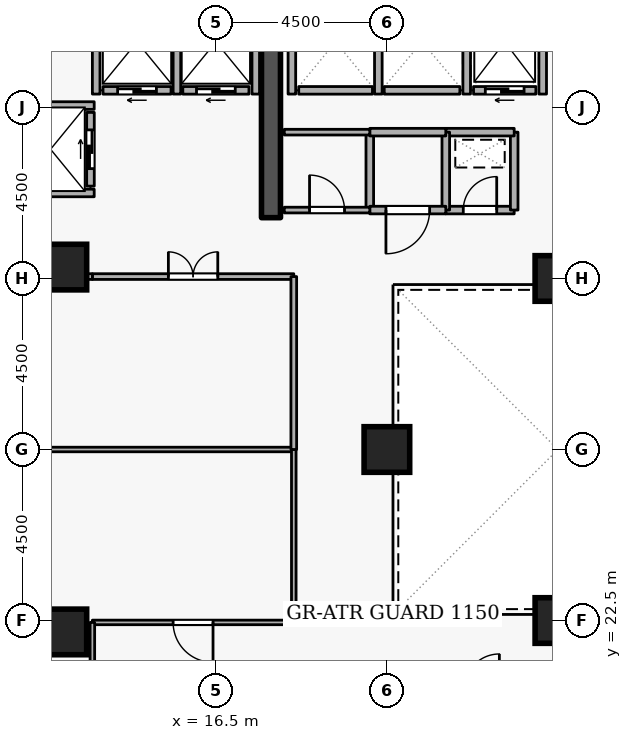
"""IFC4 building model, lengths in metres.
Left out: names, types, materials, properties, quantities, classifications, styles, units other than length and angle.
Written with IfcOpenShell. Run it as: python <this file> out.ifc"""

import sys

from ifc_helpers import new_model, si_unit, direction, frame, frame_2d, origin, origin_2d, place, context, subcontext, project, spatial, rectangle, extrude, element, fill, save


model = new_model("IFC4")
c1 = context("Model", 3, precision=1e-05, world=origin(), true_north=direction((0.0, 1.0)))
c2 = subcontext(c1, "Body", "Model", "MODEL_VIEW")
j1 = project(units=[si_unit("LENGTHUNIT", "METRE"), si_unit("PLANEANGLEUNIT", "RADIAN")], contexts=[c1])
p1 = place(None, origin())
s1 = spatial("IfcSite", under=j1, at=p1, CompositionType="ELEMENT")
p2 = place(p1, origin())
s2 = spatial("IfcBuilding", under=s1, at=p2, CompositionType="ELEMENT")
p3 = place(p2, frame((0.0, 0.0, 126.9)))
s3 = spatial("IfcBuildingStorey", under=s2, at=p3, CompositionType="ELEMENT", Elevation=126.9)
p4 = place(p3, frame((17.95, 33.1, 0.0), z_axis=(0.0, 0.0, 1.0), x_axis=(0.0, 1.0, 0.0)))
e1 = element("IfcWall", 1, at=p4, inside=s3, PredefinedType="SHEAR", context=c2, shape_type="SweptSolid", body=[
    extrude(rectangle(XDim=5.8, YDim=0.5, at=frame_2d((2.9, 0.0))), origin(), (0.0, 0.0, 1.0), 3.6),
])
for number, where, z_axis, x_axis in (
    (2, (12.5, 22.2, 0.0), (0.0, 0.0, 1.0), (1.0, 0.0, 0.0)),
    (3, (12.5, 31.8, 0.0), (0.0, 0.0, 1.0), (1.0, 0.0, 0.0)),
    (4, (25.5, 22.5, 0.0), (0.0, 0.0, 1.0), (1.0, 0.0, 0.0)),
    (5, (25.5, 31.5, 0.0), (0.0, 0.0, 1.0), (1.0, 0.0, 0.0)),
    (6, (21.0, 27.0, 0.0), (0.0, 0.0, 1.0), (1.0, 0.0, 0.0)),
):
    element("IfcColumn", number, at=place(p3, frame(where, z_axis=z_axis, x_axis=x_axis)), inside=s3, PredefinedType="COLUMN", context=c2, shape_type="SweptSolid", body=[
        extrude(rectangle(XDim=1.2, YDim=1.2, at=origin_2d()), origin(), (0.0, 0.0, 1.0), 3.6),
    ])
p5 = place(p3, frame((24.92, 36.45, 0.0), z_axis=(0.0, 0.0, 1.0), x_axis=(-1.0, 0.0, 0.0)))
e7 = element("IfcWall", 7, at=p5, inside=s3, PredefinedType="STANDARD", context=c2, shape_type="SweptSolid", body=[
    extrude(rectangle(XDim=1.64, YDim=0.2, at=frame_2d((0.82, 0.0))), origin(), (0.0, 0.0, 1.0), 3.34),
])
p6 = place(p5, frame((0.31, 0.0, 0.0)))
e8 = element("IfcOpeningElement", 8, at=p6, cuts=e7, PredefinedType="OPENING", context=c2, shape_type="SweptSolid", body=[
    extrude(rectangle(XDim=1.02, YDim=2.06, at=frame_2d((0.51, 1.03))), frame((0.0, 0.11, 0.0), z_axis=(0.0, -1.0, 0.0), x_axis=(1.0, 0.0, 0.0)), (0.0, 0.0, 1.0), 0.22),
])
p7 = place(p3, frame((22.92, 36.45, 0.0), z_axis=(0.0, 0.0, 1.0), x_axis=(-1.0, 0.0, 0.0)))
e9 = element("IfcWall", 9, at=p7, inside=s3, PredefinedType="STANDARD", context=c2, shape_type="SweptSolid", body=[
    extrude(rectangle(XDim=1.99, YDim=0.2, at=frame_2d((0.995, 0.0))), origin(), (0.0, 0.0, 1.0), 3.34),
])
p8 = place(p3, frame((20.62, 36.45, 0.0), z_axis=(0.0, 0.0, 1.0), x_axis=(-1.0, 0.0, 0.0)))
e10 = element("IfcWall", 10, at=p8, inside=s3, PredefinedType="STANDARD", context=c2, shape_type="SweptSolid", body=[
    extrude(rectangle(XDim=1.94, YDim=0.2, at=frame_2d((0.97, 0.0))), origin(), (0.0, 0.0, 1.0), 3.34),
])
p9 = place(p3, frame((17.37, 36.45, 0.0), z_axis=(0.0, 0.0, 1.0), x_axis=(-1.0, 0.0, 0.0)))
e11 = element("IfcWall", 11, at=p9, inside=s3, PredefinedType="STANDARD", context=c2, shape_type="SweptSolid", body=[
    extrude(rectangle(XDim=1.74, YDim=0.2, at=frame_2d((0.87, 0.0))), origin(), (0.0, 0.0, 1.0), 3.34),
])
p10 = place(p9, frame((0.36, 0.0, 0.0)))
e12 = element("IfcOpeningElement", 12, at=p10, cuts=e11, PredefinedType="OPENING", context=c2, shape_type="SweptSolid", body=[
    extrude(rectangle(XDim=1.02, YDim=2.06, at=frame_2d((0.51, 1.03))), frame((0.0, 0.11, 0.0), z_axis=(0.0, -1.0, 0.0), x_axis=(1.0, 0.0, 0.0)), (0.0, 0.0, 1.0), 0.22),
])
p11 = place(p3, frame((15.32, 36.45, 0.0), z_axis=(0.0, 0.0, 1.0), x_axis=(-1.0, 0.0, 0.0)))
e13 = element("IfcWall", 13, at=p11, inside=s3, PredefinedType="STANDARD", context=c2, shape_type="SweptSolid", body=[
    extrude(rectangle(XDim=1.79, YDim=0.2, at=frame_2d((0.895, 0.0))), origin(), (0.0, 0.0, 1.0), 3.34),
])
p12 = place(p11, frame((0.385, 0.0, 0.0)))
e14 = element("IfcOpeningElement", 14, at=p12, cuts=e13, PredefinedType="OPENING", context=c2, shape_type="SweptSolid", body=[
    extrude(rectangle(XDim=1.02, YDim=2.06, at=frame_2d((0.51, 1.03))), frame((0.0, 0.11, 0.0), z_axis=(0.0, -1.0, 0.0), x_axis=(1.0, 0.0, 0.0)), (0.0, 0.0, 1.0), 0.22),
])
p13 = place(p3, frame((13.2, 33.93, 0.0), z_axis=(0.0, 0.0, 1.0), x_axis=(0.0, 1.0, 0.0)))
e15 = element("IfcWall", 15, at=p13, inside=s3, PredefinedType="STANDARD", context=c2, shape_type="SweptSolid", body=[
    extrude(rectangle(XDim=1.94, YDim=0.2, at=frame_2d((0.97, 0.0))), origin(), (0.0, 0.0, 1.0), 3.34),
])
p14 = place(p13, frame((0.46, 0.0, 0.0)))
e16 = element("IfcOpeningElement", 16, at=p14, cuts=e15, PredefinedType="OPENING", context=c2, shape_type="SweptSolid", body=[
    extrude(rectangle(XDim=1.02, YDim=2.06, at=frame_2d((0.51, 1.03))), frame((0.0, 0.11, 0.0), z_axis=(0.0, -1.0, 0.0), x_axis=(1.0, 0.0, 0.0)), (0.0, 0.0, 1.0), 0.22),
])
for number, where, z_axis, x_axis in (
    (17, (25.1, 36.352, 0.0), (0.0, 0.0, 1.0), (0.0, 1.0, 0.0)),
    (18, (23.1, 36.352, 0.0), (0.0, 0.0, 1.0), (0.0, 1.0, 0.0)),
    (19, (20.775, 36.352, 0.0), (0.0, 0.0, 1.0), (0.0, 1.0, 0.0)),
    (20, (18.5, 36.352, 0.0), (0.0, 0.0, 1.0), (0.0, 1.0, 0.0)),
):
    element("IfcWall", number, at=place(p3, frame(where, z_axis=z_axis, x_axis=x_axis)), inside=s3, PredefinedType="STANDARD", context=c2, shape_type="SweptSolid", body=[
        extrude(rectangle(XDim=2.536, YDim=0.2, at=frame_2d((1.268, 0.0))), origin(), (0.0, 0.0, 1.0), 3.34),
    ])
p15 = place(p3, frame((17.55, 36.352, 0.0), z_axis=(0.0, 0.0, 1.0), x_axis=(0.0, 1.0, 0.0)))
e21 = element("IfcWall", 21, at=p15, inside=s3, PredefinedType="STANDARD", context=c2, shape_type="SweptSolid", body=[
    extrude(rectangle(XDim=2.636, YDim=0.2, at=frame_2d((1.318, 0.0))), origin(), (0.0, 0.0, 1.0), 2.545),
])
for number, where, z_axis, x_axis in (
    (22, (15.475, 36.352, 0.0), (0.0, 0.0, 1.0), (0.0, 1.0, 0.0)),
    (23, (13.35, 36.352, 0.0), (0.0, 0.0, 1.0), (0.0, 1.0, 0.0)),
):
    element("IfcWall", number, at=place(p3, frame(where, z_axis=z_axis, x_axis=x_axis)), inside=s3, PredefinedType="STANDARD", context=c2, shape_type="SweptSolid", body=[
        extrude(rectangle(XDim=2.636, YDim=0.2, at=frame_2d((1.318, 0.0))), origin(), (0.0, 0.0, 1.0), 3.34),
    ])
for number, where, z_axis, x_axis in (
    (24, (11.002, 36.05, 0.0), (0.0, 0.0, 1.0), (1.0, 0.0, 0.0)),
    (25, (11.002, 33.75, 0.0), (0.0, 0.0, 1.0), (1.0, 0.0, 0.0)),
):
    element("IfcWall", number, at=place(p3, frame(where, z_axis=z_axis, x_axis=x_axis)), inside=s3, PredefinedType="STANDARD", context=c2, shape_type="SweptSolid", body=[
        extrude(rectangle(XDim=2.296, YDim=0.2, at=frame_2d((1.148, 0.0))), origin(), (0.0, 0.0, 1.0), 3.34),
    ])
p16 = place(p3, frame((22.55, 33.3, 0.0), z_axis=(0.0, 0.0, 1.0), x_axis=(1.0, 0.0, 0.0)))
e26 = element("IfcWall", 26, at=p16, inside=s3, PredefinedType="STANDARD", context=c2, shape_type="SweptSolid", body=[
    extrude(rectangle(XDim=1.8, YDim=0.2, at=frame_2d((0.9, 0.0))), origin(), (0.0, 0.0, 1.0), 3.34),
])
p17 = place(p16, frame((0.46, 0.0, 0.0)))
e27 = element("IfcOpeningElement", 27, at=p17, cuts=e26, PredefinedType="OPENING", context=c2, shape_type="SweptSolid", body=[
    extrude(rectangle(XDim=0.88, YDim=2.04, at=frame_2d((0.44, 1.02))), frame((0.0, 0.11, 0.0), z_axis=(0.0, -1.0, 0.0), x_axis=(1.0, 0.0, 0.0)), (0.0, 0.0, 1.0), 0.22),
])
p18 = place(p3, frame((24.35, 33.3, 0.0), z_axis=(0.0, 0.0, 1.0), x_axis=(0.0, 1.0, 0.0)))
e28 = element("IfcWall", 28, at=p18, inside=s3, PredefinedType="STANDARD", context=c2, shape_type="SweptSolid", body=[
    extrude(rectangle(XDim=2.05, YDim=0.2, at=frame_2d((1.025, 0.0))), origin(), (0.0, 0.0, 1.0), 3.34),
])
p19 = place(p3, frame((24.35, 35.35, 0.0), z_axis=(0.0, 0.0, 1.0), x_axis=(-1.0, 0.0, 0.0)))
e29 = element("IfcWall", 29, at=p19, inside=s3, PredefinedType="STANDARD", context=c2, shape_type="SweptSolid", body=[
    extrude(rectangle(XDim=1.8, YDim=0.2, at=frame_2d((0.9, 0.0))), origin(), (0.0, 0.0, 1.0), 3.34),
])
for number, where, z_axis, x_axis in (
    (30, (22.55, 35.35, 0.0), (0.0, 0.0, 1.0), (0.0, -1.0, 0.0)),
    (31, (20.55, 33.3, 0.0), (0.0, 0.0, 1.0), (0.0, 1.0, 0.0)),
):
    element("IfcWall", number, at=place(p3, frame(where, z_axis=z_axis, x_axis=x_axis)), inside=s3, PredefinedType="STANDARD", context=c2, shape_type="SweptSolid", body=[
        extrude(rectangle(XDim=2.05, YDim=0.2, at=frame_2d((1.025, 0.0))), origin(), (0.0, 0.0, 1.0), 3.34),
    ])
p20 = place(p3, frame((20.55, 35.35, 0.0), z_axis=(0.0, 0.0, 1.0), x_axis=(1.0, 0.0, 0.0)))
e32 = element("IfcWall", 32, at=p20, inside=s3, PredefinedType="STANDARD", context=c2, shape_type="SweptSolid", body=[
    extrude(rectangle(XDim=2.0, YDim=0.2, at=frame_2d((1.0, 0.0))), origin(), (0.0, 0.0, 1.0), 3.34),
])
p21 = place(p3, frame((22.55, 33.3, 0.0), z_axis=(0.0, 0.0, 1.0), x_axis=(-1.0, 0.0, 0.0)))
e33 = element("IfcWall", 33, at=p21, inside=s3, PredefinedType="STANDARD", context=c2, shape_type="SweptSolid", body=[
    extrude(rectangle(XDim=2.0, YDim=0.2, at=frame_2d((1.0, 0.0))), origin(), (0.0, 0.0, 1.0), 3.34),
])
p22 = place(p21, frame((0.425, 0.0, 0.0)))
e34 = element("IfcOpeningElement", 34, at=p22, cuts=e33, PredefinedType="OPENING", context=c2, shape_type="SweptSolid", body=[
    extrude(rectangle(XDim=1.15, YDim=2.1, at=frame_2d((0.575, 1.05))), frame((0.0, 0.11, 0.0), z_axis=(0.0, -1.0, 0.0), x_axis=(1.0, 0.0, 0.0)), (0.0, 0.0, 1.0), 0.22),
])
p23 = place(p3, frame((18.3, 33.3, 0.0), z_axis=(0.0, 0.0, 1.0), x_axis=(1.0, 0.0, 0.0)))
e35 = element("IfcWall", 35, at=p23, inside=s3, PredefinedType="PARTITIONING", context=c2, shape_type="SweptSolid", body=[
    extrude(rectangle(XDim=2.25, YDim=0.15, at=frame_2d((1.125, 0.0))), origin(), (0.0, 0.0, 1.0), 3.34),
])
p24 = place(p23, frame((0.665, 0.0, 0.0)))
e36 = element("IfcOpeningElement", 36, at=p24, cuts=e35, PredefinedType="OPENING", context=c2, shape_type="SweptSolid", body=[
    extrude(rectangle(XDim=0.92, YDim=2.08, at=frame_2d((0.46, 1.04))), frame((0.0, 0.085, 0.0), z_axis=(0.0, -1.0, 0.0), x_axis=(1.0, 0.0, 0.0)), (0.0, 0.0, 1.0), 0.17),
])
p25 = place(p3, frame((20.55, 35.35, 0.0), z_axis=(0.0, 0.0, 1.0), x_axis=(-1.0, 0.0, 0.0)))
e37 = element("IfcWall", 37, at=p25, inside=s3, PredefinedType="PARTITIONING", context=c2, shape_type="SweptSolid", body=[
    extrude(rectangle(XDim=2.25, YDim=0.15, at=frame_2d((1.125, 0.0))), origin(), (0.0, 0.0, 1.0), 3.34),
])
p26 = place(p3, frame((18.55, 22.45, 0.0), z_axis=(0.0, 0.0, 1.0), x_axis=(-1.0, 0.0, 0.0)))
e38 = element("IfcWall", 38, at=p26, inside=s3, PredefinedType="PARTITIONING", context=c2, shape_type="SweptSolid", body=[
    extrude(rectangle(XDim=5.3, YDim=0.12, at=frame_2d((2.65, 0.0))), origin(), (0.0, 0.0, 1.0), 3.34),
])
p27 = place(p26, frame((2.125, 0.0, 0.0)))
e39 = element("IfcOpeningElement", 39, at=p27, cuts=e38, PredefinedType="OPENING", context=c2, shape_type="SweptSolid", body=[
    extrude(rectangle(XDim=1.05, YDim=2.1, at=frame_2d((0.525, 1.05))), frame((0.0, 0.07, 0.0), z_axis=(0.0, -1.0, 0.0), x_axis=(1.0, 0.0, 0.0)), (0.0, 0.0, 1.0), 0.14),
])
p28 = place(p3, frame((13.25, 22.45, 0.0), z_axis=(0.0, 0.0, 1.0), x_axis=(0.0, -1.0, 0.0)))
e40 = element("IfcWall", 40, at=p28, inside=s3, PredefinedType="PARTITIONING", context=c2, shape_type="SweptSolid", body=[
    extrude(rectangle(XDim=1.75, YDim=0.12, at=frame_2d((0.875, 0.0))), origin(), (0.0, 0.0, 1.0), 3.34),
])
p29 = place(p3, frame((1.78, 27.0, 0.0), z_axis=(0.0, 0.0, 1.0), x_axis=(1.0, 0.0, 0.0)))
e41 = element("IfcWall", 41, at=p29, inside=s3, PredefinedType="PARTITIONING", context=c2, shape_type="SweptSolid", body=[
    extrude(rectangle(XDim=16.77, YDim=0.12, at=frame_2d((8.385, 0.0))), origin(), (0.0, 0.0, 1.0), 2.932),
])
p30 = place(p3, frame((18.55, 27.0, 0.0), z_axis=(0.0, 0.0, 1.0), x_axis=(0.0, -1.0, 0.0)))
e42 = element("IfcWall", 42, at=p30, inside=s3, PredefinedType="PARTITIONING", context=c2, shape_type="SweptSolid", body=[
    extrude(rectangle(XDim=4.55, YDim=0.12, at=frame_2d((2.275, 0.0))), origin(), (0.0, 0.0, 1.0), 3.34),
])
p31 = place(p3, frame((13.25, 31.55, 0.0), z_axis=(0.0, 0.0, 1.0), x_axis=(1.0, 0.0, 0.0)))
e43 = element("IfcWall", 43, at=p31, inside=s3, PredefinedType="PARTITIONING", context=c2, shape_type="SweptSolid", body=[
    extrude(rectangle(XDim=5.3, YDim=0.15, at=frame_2d((2.65, 0.0))), origin(), (0.0, 0.0, 1.0), 3.34),
])
p32 = place(p31, frame((2.0, 0.0, 0.0)))
e44 = element("IfcOpeningElement", 44, at=p32, cuts=e43, PredefinedType="OPENING", context=c2, shape_type="SweptSolid", body=[
    extrude(rectangle(XDim=1.3, YDim=2.12, at=frame_2d((0.65, 1.06))), frame((0.0, 0.085, 0.0), z_axis=(0.0, -1.0, 0.0), x_axis=(1.0, 0.0, 0.0)), (0.0, 0.0, 1.0), 0.17),
])
p33 = place(p3, frame((18.55, 31.55, 0.0), z_axis=(0.0, 0.0, 1.0), x_axis=(0.0, -1.0, 0.0)))
e45 = element("IfcWall", 45, at=p33, inside=s3, PredefinedType="PARTITIONING", context=c2, shape_type="SweptSolid", body=[
    extrude(rectangle(XDim=4.55, YDim=0.15, at=frame_2d((2.275, 0.0))), origin(), (0.0, 0.0, 1.0), 3.34),
])
p34 = place(p3, frame((10.9, 31.55, 0.0), z_axis=(0.0, 0.0, 1.0), x_axis=(1.0, 0.0, 0.0)))
e46 = element("IfcWall", 46, at=p34, inside=s3, PredefinedType="PARTITIONING", context=c2, shape_type="SweptSolid", body=[
    extrude(rectangle(XDim=2.35, YDim=0.15, at=frame_2d((1.175, 0.0))), origin(), (0.0, 0.0, 1.0), 3.34),
])
p35 = place(p6, origin())
e47 = element("IfcDoor", 47, at=p35, inside=s3, OperationType="SLIDING_TO_LEFT", PredefinedType="DOOR", context=c2, shape_type="SweptSolid", body=[
    extrude(rectangle(XDim=1.02, YDim=2.06, at=frame_2d((0.51, 1.03))), frame((0.0, 0.025, 0.0), z_axis=(0.0, -1.0, 0.0), x_axis=(1.0, 0.0, 0.0)), (0.0, 0.0, 1.0), 0.05),
])
fill(e8, e47)
p36 = place(p10, origin())
e48 = element("IfcDoor", 48, at=p36, inside=s3, OperationType="SLIDING_TO_LEFT", PredefinedType="DOOR", context=c2, shape_type="SweptSolid", body=[
    extrude(rectangle(XDim=1.02, YDim=2.06, at=frame_2d((0.51, 1.03))), frame((0.0, 0.025, 0.0), z_axis=(0.0, -1.0, 0.0), x_axis=(1.0, 0.0, 0.0)), (0.0, 0.0, 1.0), 0.05),
])
fill(e12, e48)
p37 = place(p12, origin())
e49 = element("IfcDoor", 49, at=p37, inside=s3, OperationType="SLIDING_TO_LEFT", PredefinedType="DOOR", context=c2, shape_type="SweptSolid", body=[
    extrude(rectangle(XDim=1.02, YDim=2.06, at=frame_2d((0.51, 1.03))), frame((0.0, 0.025, 0.0), z_axis=(0.0, -1.0, 0.0), x_axis=(1.0, 0.0, 0.0)), (0.0, 0.0, 1.0), 0.05),
])
fill(e14, e49)
p38 = place(p14, origin())
e50 = element("IfcDoor", 50, at=p38, inside=s3, OperationType="SLIDING_TO_LEFT", PredefinedType="DOOR", context=c2, shape_type="SweptSolid", body=[
    extrude(rectangle(XDim=1.02, YDim=2.06, at=frame_2d((0.51, 1.03))), frame((0.0, 0.025, 0.0), z_axis=(0.0, -1.0, 0.0), x_axis=(1.0, 0.0, 0.0)), (0.0, 0.0, 1.0), 0.05),
])
fill(e16, e50)
p39 = place(p17, origin())
e51 = element("IfcDoor", 51, at=p39, inside=s3, OperationType="SINGLE_SWING_RIGHT", PredefinedType="DOOR", context=c2, shape_type="SweptSolid", body=[
    extrude(rectangle(XDim=0.88, YDim=2.04, at=frame_2d((0.44, 1.02))), frame((0.0, 0.025, 0.0), z_axis=(0.0, -1.0, 0.0), x_axis=(1.0, 0.0, 0.0)), (0.0, 0.0, 1.0), 0.05),
])
fill(e27, e51)
p40 = place(p24, origin())
e52 = element("IfcDoor", 52, at=p40, inside=s3, OperationType="SINGLE_SWING_LEFT", PredefinedType="DOOR", context=c2, shape_type="SweptSolid", body=[
    extrude(rectangle(XDim=0.92, YDim=2.08, at=frame_2d((0.46, 1.04))), frame((0.0, 0.025, 0.0), z_axis=(0.0, -1.0, 0.0), x_axis=(1.0, 0.0, 0.0)), (0.0, 0.0, 1.0), 0.05),
])
fill(e36, e52)
p41 = place(p22, origin())
e53 = element("IfcDoor", 53, at=p41, inside=s3, OperationType="SINGLE_SWING_RIGHT", PredefinedType="DOOR", context=c2, shape_type="SweptSolid", body=[
    extrude(rectangle(XDim=1.15, YDim=2.1, at=frame_2d((0.575, 1.05))), frame((0.0, 0.025, 0.0), z_axis=(0.0, -1.0, 0.0), x_axis=(1.0, 0.0, 0.0)), (0.0, 0.0, 1.0), 0.05),
])
fill(e34, e53)
p42 = place(p27, origin())
e54 = element("IfcDoor", 54, at=p42, inside=s3, OperationType="SINGLE_SWING_LEFT", PredefinedType="DOOR", context=c2, shape_type="SweptSolid", body=[
    extrude(rectangle(XDim=1.05, YDim=2.1, at=frame_2d((0.525, 1.05))), frame((0.0, 0.025, 0.0), z_axis=(0.0, -1.0, 0.0), x_axis=(1.0, 0.0, 0.0)), (0.0, 0.0, 1.0), 0.05),
])
fill(e39, e54)
p43 = place(p32, origin())
e55 = element("IfcDoor", 55, at=p43, inside=s3, OperationType="DOUBLE_DOOR_SINGLE_SWING", PredefinedType="DOOR", context=c2, shape_type="SweptSolid", body=[
    extrude(rectangle(XDim=1.3, YDim=2.12, at=frame_2d((0.65, 1.06))), frame((0.0, 0.025, 0.0), z_axis=(0.0, -1.0, 0.0), x_axis=(1.0, 0.0, 0.0)), (0.0, 0.0, 1.0), 0.05),
])
fill(e44, e55)
save(model, sys.argv[1])
